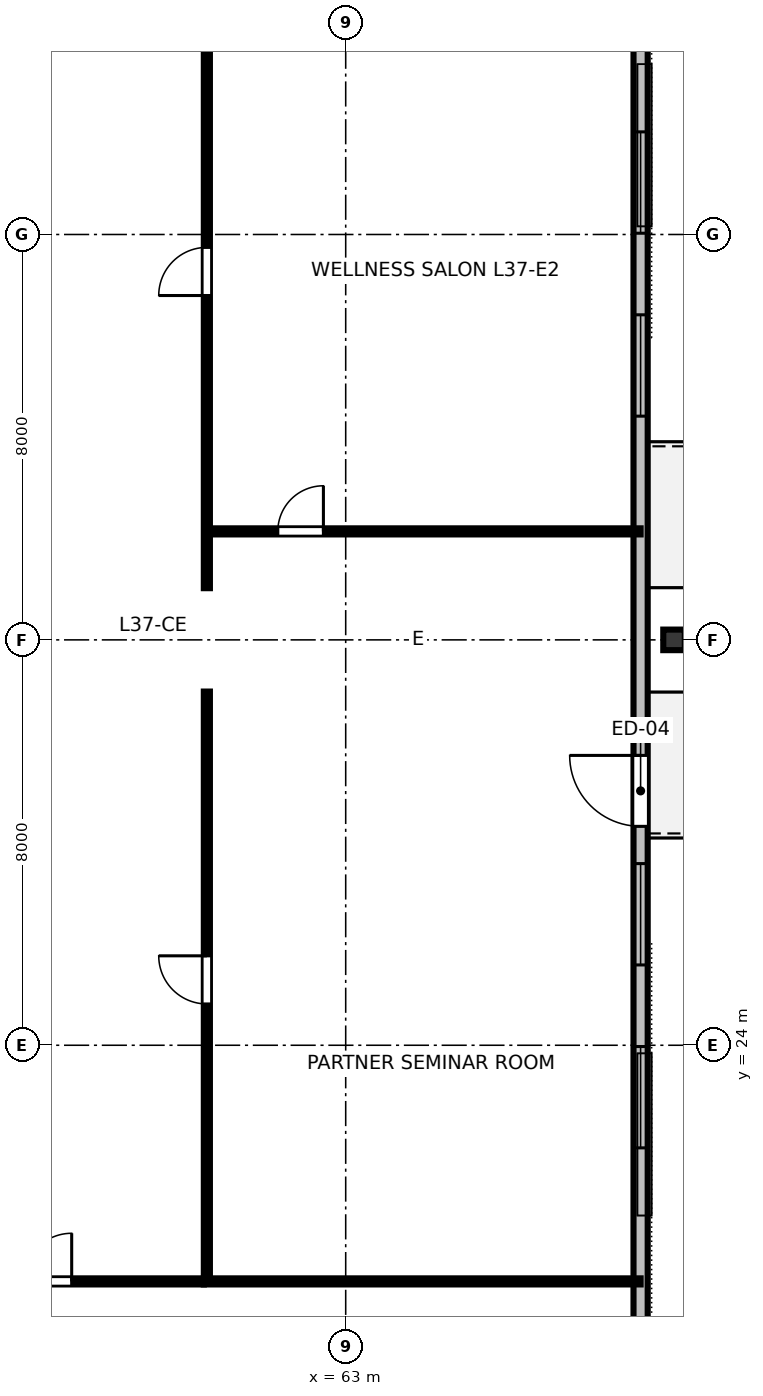
"""IFC4 building model, lengths in metres.
Left out: names, types, materials, properties, quantities, classifications, styles, units other than length and angle.
Written with IfcOpenShell. Run it as: python <this file> out.ifc"""

import sys

from ifc_helpers import new_model, si_unit, direction, frame, frame_2d, origin, origin_2d, place, context, subcontext, project, spatial, rectangle, i_section, extrude, element, fill, save


model = new_model("IFC4")
c1 = context("Model", 3, precision=1e-05, world=origin(), true_north=direction((0.0, 1.0)))
c2 = subcontext(c1, "Body", "Model", "MODEL_VIEW")
j1 = project(units=[si_unit("LENGTHUNIT", "METRE"), si_unit("PLANEANGLEUNIT", "RADIAN")], contexts=[c1])
p1 = place(None, origin())
s1 = spatial("IfcSite", under=j1, at=p1, CompositionType="ELEMENT")
p2 = place(p1, origin())
s2 = spatial("IfcBuilding", under=s1, at=p2, CompositionType="ELEMENT")
p3 = place(p2, frame((0.0, 0.0, 142.0)))
s3 = spatial("IfcBuildingStorey", under=s2, at=p3, CompositionType="ELEMENT", Elevation=142.0)
p4 = place(p3, frame((69.48, 32.0, 0.0), z_axis=(0.0, 0.0, 1.0), x_axis=(0.0, 1.0, 0.0)))
e1 = element("IfcColumn", 1, at=p4, inside=s3, PredefinedType="COLUMN", context=c2, shape_type="SweptSolid", body=[
    extrude(i_section(OverallWidth=0.406, OverallDepth=0.425, WebThickness=0.033, FlangeThickness=0.052, FilletRadius=0.025, at=origin_2d()), origin(), (0.0, 0.0, 1.0), 3.358),
])
p5 = place(p3, frame((68.82, 16.46, 0.0), z_axis=(0.0, 0.0, 1.0), x_axis=(0.0, 1.0, 0.0)))
e2 = element("IfcWall", 2, at=p5, inside=s3, PredefinedType="STANDARD", context=c2, shape_type="SweptSolid", body=[
    extrude(rectangle(XDim=31.08, YDim=0.28, at=frame_2d((15.54, 0.0))), origin(), (0.0, 0.0, 1.0), 3.36),
])
p6 = place(p5, frame((11.86, 0.0, 0.0)))
e3 = element("IfcOpeningElement", 3, at=p6, cuts=e2, PredefinedType="OPENING", context=c2, shape_type="SweptSolid", body=[
    extrude(rectangle(XDim=1.4, YDim=2.15, at=frame_2d((0.7, 1.075))), frame((0.0, 0.15, 0.0), z_axis=(0.0, -1.0, 0.0), x_axis=(1.0, 0.0, 0.0)), (0.0, 0.0, 1.0), 0.3),
])
p7 = place(p5, frame((5.515, 0.0, 0.8)))
e4 = element("IfcOpeningElement", 4, at=p7, cuts=e2, PredefinedType="OPENING", context=c2, shape_type="SweptSolid", body=[
    extrude(rectangle(XDim=2.0, YDim=1.95, at=frame_2d((1.0, 0.975))), frame((0.0, 0.15, 0.0), z_axis=(0.0, -1.0, 0.0), x_axis=(1.0, 0.0, 0.0)), (0.0, 0.0, 1.0), 0.3),
])
p8 = place(p5, frame((9.125, 0.0, 0.8)))
e5 = element("IfcOpeningElement", 5, at=p8, cuts=e2, PredefinedType="OPENING", context=c2, shape_type="SweptSolid", body=[
    extrude(rectangle(XDim=2.0, YDim=1.95, at=frame_2d((1.0, 0.975))), frame((0.0, 0.15, 0.0), z_axis=(0.0, -1.0, 0.0), x_axis=(1.0, 0.0, 0.0)), (0.0, 0.0, 1.0), 0.3),
])
p9 = place(p5, frame((19.955, 0.0, 0.8)))
e6 = element("IfcOpeningElement", 6, at=p9, cuts=e2, PredefinedType="OPENING", context=c2, shape_type="SweptSolid", body=[
    extrude(rectangle(XDim=2.0, YDim=1.95, at=frame_2d((1.0, 0.975))), frame((0.0, 0.15, 0.0), z_axis=(0.0, -1.0, 0.0), x_axis=(1.0, 0.0, 0.0)), (0.0, 0.0, 1.0), 0.3),
])
p10 = place(p5, frame((23.565, 0.0, 0.8)))
e7 = element("IfcOpeningElement", 7, at=p10, cuts=e2, PredefinedType="OPENING", context=c2, shape_type="SweptSolid", body=[
    extrude(rectangle(XDim=2.0, YDim=1.95, at=frame_2d((1.0, 0.975))), frame((0.0, 0.15, 0.0), z_axis=(0.0, -1.0, 0.0), x_axis=(1.0, 0.0, 0.0)), (0.0, 0.0, 1.0), 0.3),
])
p11 = place(p3, frame((31.8, 19.34, 0.0), z_axis=(0.0, 0.0, 1.0), x_axis=(1.0, 0.0, 0.0)))
e8 = element("IfcWall", 8, at=p11, inside=s3, PredefinedType="PARTITIONING", context=c2, shape_type="SweptSolid", body=[
    extrude(rectangle(XDim=28.4, YDim=0.12, at=frame_2d((14.2, 0.0))), origin(), (0.0, 0.0, 1.0), 2.64),
])
p12 = place(p11, frame((3.771, 0.0, 0.0)))
e9 = element("IfcOpeningElement", 9, at=p12, cuts=e8, PredefinedType="OPENING", context=c2, shape_type="SweptSolid", body=[
    extrude(rectangle(XDim=0.95, YDim=2.15, at=frame_2d((0.475, 1.075))), frame((0.0, 0.07, 0.0), z_axis=(0.0, -1.0, 0.0), x_axis=(1.0, 0.0, 0.0)), (0.0, 0.0, 1.0), 0.14),
])
p13 = place(p11, frame((10.068, 0.0, 0.0)))
e10 = element("IfcOpeningElement", 10, at=p13, cuts=e8, PredefinedType="OPENING", context=c2, shape_type="SweptSolid", body=[
    extrude(rectangle(XDim=0.95, YDim=2.15, at=frame_2d((0.475, 1.075))), frame((0.0, 0.07, 0.0), z_axis=(0.0, -1.0, 0.0), x_axis=(1.0, 0.0, 0.0)), (0.0, 0.0, 1.0), 0.14),
])
p14 = place(p11, frame((13.828, 0.0, 0.0)))
e11 = element("IfcOpeningElement", 11, at=p14, cuts=e8, PredefinedType="OPENING", context=c2, shape_type="SweptSolid", body=[
    extrude(rectangle(XDim=0.95, YDim=2.15, at=frame_2d((0.475, 1.075))), frame((0.0, 0.07, 0.0), z_axis=(0.0, -1.0, 0.0), x_axis=(1.0, 0.0, 0.0)), (0.0, 0.0, 1.0), 0.14),
])
p15 = place(p11, frame((18.648, 0.0, 0.0)))
e12 = element("IfcOpeningElement", 12, at=p15, cuts=e8, PredefinedType="OPENING", context=c2, shape_type="SweptSolid", body=[
    extrude(rectangle(XDim=0.95, YDim=2.15, at=frame_2d((0.475, 1.075))), frame((0.0, 0.07, 0.0), z_axis=(0.0, -1.0, 0.0), x_axis=(1.0, 0.0, 0.0)), (0.0, 0.0, 1.0), 0.14),
])
p16 = place(p11, frame((24.842, 0.0, 0.0)))
e13 = element("IfcOpeningElement", 13, at=p16, cuts=e8, PredefinedType="OPENING", context=c2, shape_type="SweptSolid", body=[
    extrude(rectangle(XDim=0.95, YDim=2.15, at=frame_2d((0.475, 1.075))), frame((0.0, 0.07, 0.0), z_axis=(0.0, -1.0, 0.0), x_axis=(1.0, 0.0, 0.0)), (0.0, 0.0, 1.0), 0.14),
])
p17 = place(p3, frame((60.26, 34.141, 0.0), z_axis=(0.0, 0.0, 1.0), x_axis=(1.0, 0.0, 0.0)))
e14 = element("IfcWall", 14, at=p17, inside=s3, PredefinedType="PARTITIONING", context=c2, shape_type="SweptSolid", body=[
    extrude(rectangle(XDim=8.56, YDim=0.12, at=frame_2d((4.28, 0.0))), origin(), (0.0, 0.0, 1.0), 2.64),
])
p18 = place(p17, frame((1.4, 0.0, 0.0)))
e15 = element("IfcOpeningElement", 15, at=p18, cuts=e14, PredefinedType="OPENING", context=c2, shape_type="SweptSolid", body=[
    extrude(rectangle(XDim=0.9, YDim=2.15, at=frame_2d((0.45, 1.075))), frame((0.0, 0.07, 0.0), z_axis=(0.0, -1.0, 0.0), x_axis=(1.0, 0.0, 0.0)), (0.0, 0.0, 1.0), 0.14),
])
p19 = place(p3, frame((60.26, 19.4, 0.0), z_axis=(0.0, 0.0, 1.0), x_axis=(0.0, 1.0, 0.0)))
e16 = element("IfcWall", 16, at=p19, inside=s3, PredefinedType="PARTITIONING", context=c2, shape_type="SweptSolid", body=[
    extrude(rectangle(XDim=11.58, YDim=0.12, at=frame_2d((5.79, 0.0))), origin(), (0.0, 0.0, 1.0), 2.64),
])
p20 = place(p19, frame((5.415, 0.0, 0.0)))
e17 = element("IfcOpeningElement", 17, at=p20, cuts=e16, PredefinedType="OPENING", context=c2, shape_type="SweptSolid", body=[
    extrude(rectangle(XDim=0.95, YDim=2.15, at=frame_2d((0.475, 1.075))), frame((0.0, 0.07, 0.0), z_axis=(0.0, -1.0, 0.0), x_axis=(1.0, 0.0, 0.0)), (0.0, 0.0, 1.0), 0.14),
])
p21 = place(p3, frame((60.26, 33.02, 0.0), z_axis=(0.0, 0.0, 1.0), x_axis=(0.0, 1.0, 0.0)))
e18 = element("IfcWall", 18, at=p21, inside=s3, PredefinedType="PARTITIONING", context=c2, shape_type="SweptSolid", body=[
    extrude(rectangle(XDim=11.58, YDim=0.12, at=frame_2d((5.79, 0.0))), origin(), (0.0, 0.0, 1.0), 2.64),
])
p22 = place(p21, frame((5.775, 0.0, 0.0)))
e19 = element("IfcOpeningElement", 19, at=p22, cuts=e18, PredefinedType="OPENING", context=c2, shape_type="SweptSolid", body=[
    extrude(rectangle(XDim=0.95, YDim=2.15, at=frame_2d((0.475, 1.075))), frame((0.0, 0.07, 0.0), z_axis=(0.0, -1.0, 0.0), x_axis=(1.0, 0.0, 0.0)), (0.0, 0.0, 1.0), 0.14),
])
p23 = place(p3, frame((60.2, 19.34, 0.0), z_axis=(0.0, 0.0, 1.0), x_axis=(1.0, 0.0, 0.0)))
e20 = element("IfcWall", 20, at=p23, inside=s3, PredefinedType="PARTITIONING", context=c2, shape_type="SweptSolid", body=[
    extrude(rectangle(XDim=8.62, YDim=0.12, at=frame_2d((4.31, 0.0))), origin(), (0.0, 0.0, 1.0), 2.64),
])
p24 = place(p6, origin())
e21 = element("IfcDoor", 21, at=p24, inside=s3, OperationType="SINGLE_SWING_RIGHT", PredefinedType="DOOR", context=c2, shape_type="SweptSolid", body=[
    extrude(rectangle(XDim=1.4, YDim=2.15, at=frame_2d((0.7, 1.075))), frame((0.0, 0.025, 0.0), z_axis=(0.0, -1.0, 0.0), x_axis=(1.0, 0.0, 0.0)), (0.0, 0.0, 1.0), 0.05),
])
fill(e3, e21)
p25 = place(p7, origin())
e22 = element("IfcWindow", 22, at=p25, inside=s3, PartitioningType="SINGLE_PANEL", PredefinedType="WINDOW", context=c2, shape_type="SweptSolid", body=[
    extrude(rectangle(XDim=2.0, YDim=1.95, at=frame_2d((1.0, 0.975))), frame((0.0, 0.03, 0.0), z_axis=(0.0, -1.0, 0.0), x_axis=(1.0, 0.0, 0.0)), (0.0, 0.0, 1.0), 0.06),
])
fill(e4, e22)
p26 = place(p8, origin())
e23 = element("IfcWindow", 23, at=p26, inside=s3, PartitioningType="SINGLE_PANEL", PredefinedType="WINDOW", context=c2, shape_type="SweptSolid", body=[
    extrude(rectangle(XDim=2.0, YDim=1.95, at=frame_2d((1.0, 0.975))), frame((0.0, 0.03, 0.0), z_axis=(0.0, -1.0, 0.0), x_axis=(1.0, 0.0, 0.0)), (0.0, 0.0, 1.0), 0.06),
])
fill(e5, e23)
p27 = place(p9, origin())
e24 = element("IfcWindow", 24, at=p27, inside=s3, PartitioningType="SINGLE_PANEL", PredefinedType="WINDOW", context=c2, shape_type="SweptSolid", body=[
    extrude(rectangle(XDim=2.0, YDim=1.95, at=frame_2d((1.0, 0.975))), frame((0.0, 0.03, 0.0), z_axis=(0.0, -1.0, 0.0), x_axis=(1.0, 0.0, 0.0)), (0.0, 0.0, 1.0), 0.06),
])
fill(e6, e24)
p28 = place(p10, origin())
e25 = element("IfcWindow", 25, at=p28, inside=s3, PartitioningType="SINGLE_PANEL", PredefinedType="WINDOW", context=c2, shape_type="SweptSolid", body=[
    extrude(rectangle(XDim=2.0, YDim=1.95, at=frame_2d((1.0, 0.975))), frame((0.0, 0.03, 0.0), z_axis=(0.0, -1.0, 0.0), x_axis=(1.0, 0.0, 0.0)), (0.0, 0.0, 1.0), 0.06),
])
fill(e7, e25)
p29 = place(p16, origin())
e26 = element("IfcDoor", 26, at=p29, inside=s3, OperationType="SINGLE_SWING_RIGHT", PredefinedType="DOOR", context=c2, shape_type="SweptSolid", body=[
    extrude(rectangle(XDim=0.95, YDim=2.15, at=frame_2d((0.475, 1.075))), frame((0.0, 0.025, 0.0), z_axis=(0.0, -1.0, 0.0), x_axis=(1.0, 0.0, 0.0)), (0.0, 0.0, 1.0), 0.05),
])
fill(e13, e26)
p30 = place(p18, origin())
e27 = element("IfcDoor", 27, at=p30, inside=s3, OperationType="SINGLE_SWING_RIGHT", PredefinedType="DOOR", context=c2, shape_type="SweptSolid", body=[
    extrude(rectangle(XDim=0.9, YDim=2.15, at=frame_2d((0.45, 1.075))), frame((0.0, 0.025, 0.0), z_axis=(0.0, -1.0, 0.0), x_axis=(1.0, 0.0, 0.0)), (0.0, 0.0, 1.0), 0.05),
])
fill(e15, e27)
p31 = place(p20, origin())
e28 = element("IfcDoor", 28, at=p31, inside=s3, OperationType="SINGLE_SWING_RIGHT", PredefinedType="DOOR", context=c2, shape_type="SweptSolid", body=[
    extrude(rectangle(XDim=0.95, YDim=2.15, at=frame_2d((0.475, 1.075))), frame((0.0, 0.025, 0.0), z_axis=(0.0, -1.0, 0.0), x_axis=(1.0, 0.0, 0.0)), (0.0, 0.0, 1.0), 0.05),
])
fill(e17, e28)
p32 = place(p22, origin())
e29 = element("IfcDoor", 29, at=p32, inside=s3, OperationType="SINGLE_SWING_LEFT", PredefinedType="DOOR", context=c2, shape_type="SweptSolid", body=[
    extrude(rectangle(XDim=0.95, YDim=2.15, at=frame_2d((0.475, 1.075))), frame((0.0, 0.025, 0.0), z_axis=(0.0, -1.0, 0.0), x_axis=(1.0, 0.0, 0.0)), (0.0, 0.0, 1.0), 0.05),
])
fill(e19, e29)
save(model, sys.argv[1])
